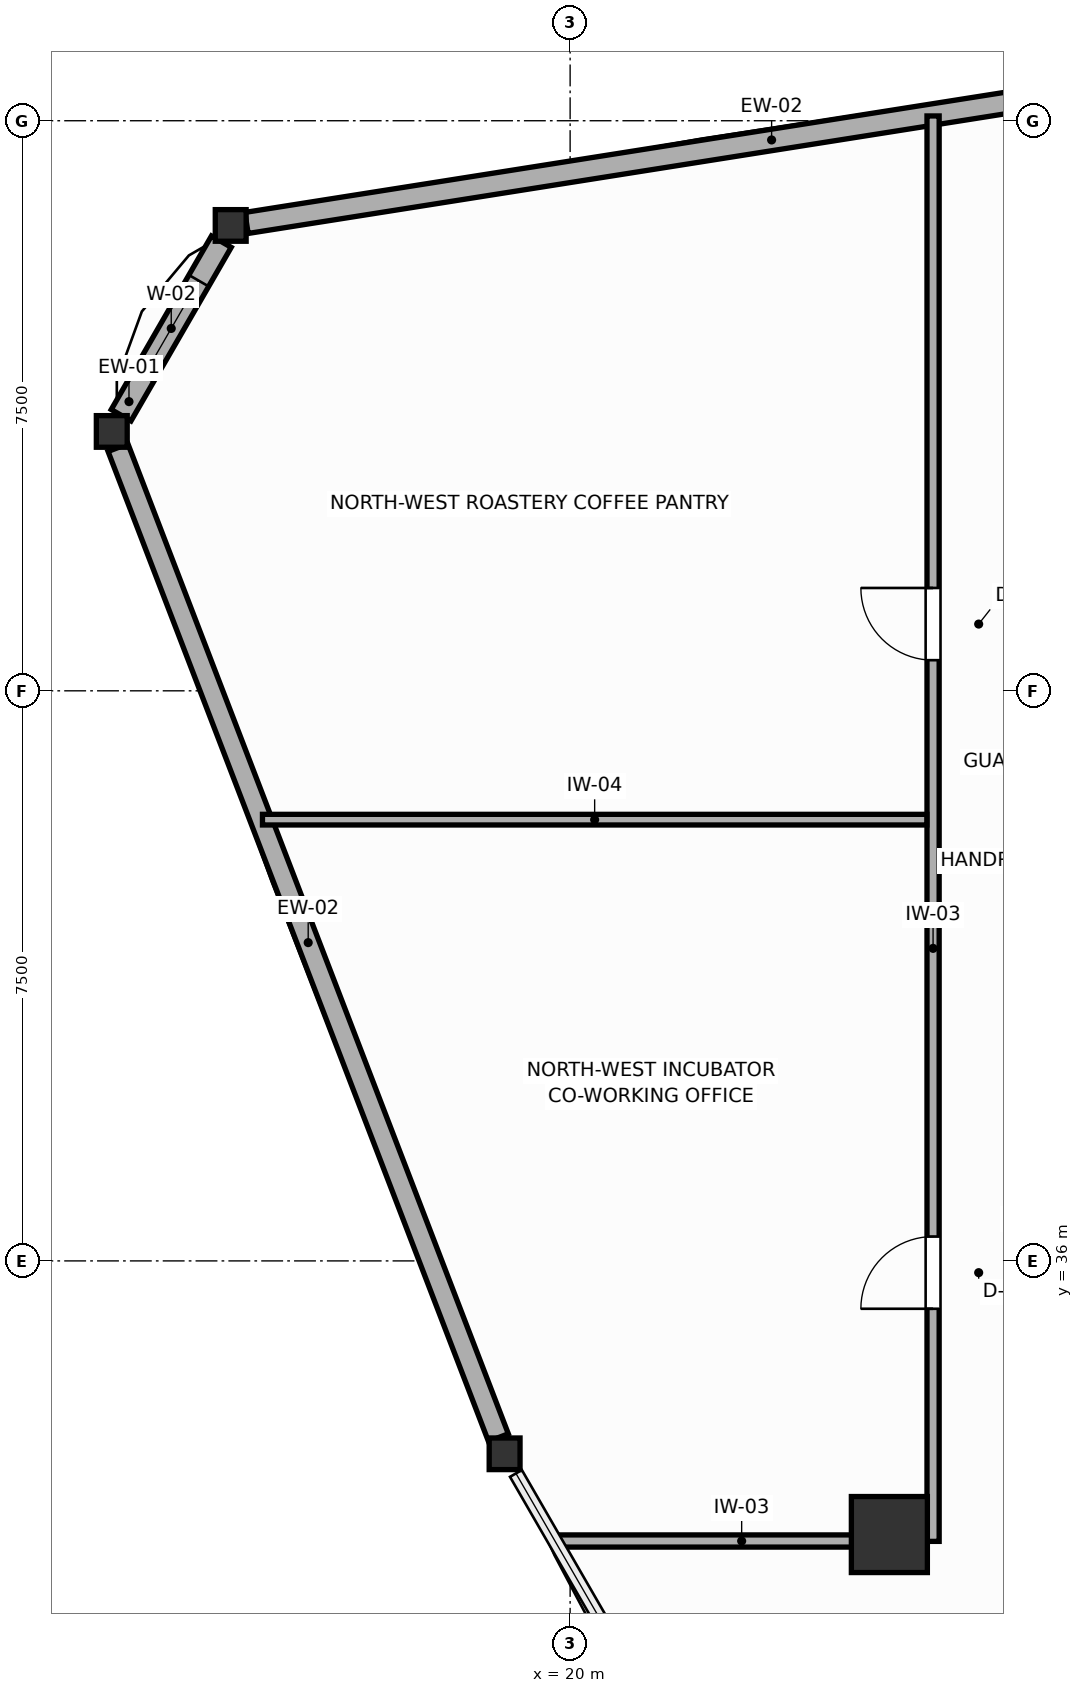
"""IFC4 building model, lengths in metres.
Left out: names, types, materials, properties, quantities, classifications, styles, units other than length and angle.
Written with IfcOpenShell. Run it as: python <this file> out.ifc"""

import sys

from ifc_helpers import new_model, si_unit, direction, frame, frame_2d, origin, origin_2d, place, context, subcontext, project, spatial, rectangle, i_section, extrude, source, transform, mapped, element, fill, save


model = new_model("IFC4")
c1 = context("Model", 3, precision=1e-05, world=origin(), true_north=direction((0.0, 1.0)))
c2 = subcontext(c1, "Body", "Model", "MODEL_VIEW")
j1 = project(units=[si_unit("LENGTHUNIT", "METRE"), si_unit("PLANEANGLEUNIT", "RADIAN")], contexts=[c1])
p1 = place(None, origin())
s1 = spatial("IfcSite", under=j1, at=p1, CompositionType="ELEMENT")
p2 = place(p1, origin())
s2 = spatial("IfcBuilding", under=s1, at=p2, CompositionType="ELEMENT")
p3 = place(p2, frame((0.0, 0.0, 193.8)))
s3 = spatial("IfcBuildingStorey", under=s2, at=p3, CompositionType="ELEMENT", Elevation=193.8)
m1 = source(origin(), c2, "Body", "SweptSolid", [
    extrude(rectangle(XDim=1.0, YDim=1.0, at=origin_2d()), origin(), (0.0, 0.0, 1.0), 3.6),
])
p4 = place(p3, frame((24.2, 32.4, 0.0), z_axis=(0.0, 0.0, 1.0), x_axis=(1.0, 0.0, 0.0)))
e1 = element("IfcColumn", 1, at=p4, inside=s3, PredefinedType="COLUMN", context=c2, shape_type="MappedRepresentation", body=[
    mapped(m1, transform((0.0, 0.0, 0.0), scale=1.0)),
])
m2 = source(origin(), c2, "Body", "SweptSolid", [
    extrude(i_section(OverallWidth=0.406, OverallDepth=0.416, WebThickness=0.027, FlangeThickness=0.044, FilletRadius=0.015, at=origin_2d()), origin(), (0.0, 0.0, 1.0), 3.6),
])
for number, where, z_axis, x_axis in (
    (2, (15.534, 49.623, 0.0), (0.0, 0.0, 1.0), (1.0, 0.0, 0.0)),
    (3, (13.97, 46.912, 0.0), (0.0, 0.0, 1.0), (1.0, 0.0, 0.0)),
    (4, (19.138, 33.462, 0.0), (0.0, 0.0, 1.0), (1.0, 0.0, 0.0)),
):
    element("IfcColumn", number, at=place(p3, frame(where, z_axis=z_axis, x_axis=x_axis)), inside=s3, PredefinedType="COLUMN", context=c2, shape_type="MappedRepresentation", body=[
        mapped(m2, transform((0.0, 0.0, 0.0), scale=1.0)),
    ])
p5 = place(p3, frame((29.559, 51.839, 0.0), z_axis=(0.0, 0.0, 1.0), x_axis=(-0.987743003355, -0.15608894683, 0.0)))
e5 = element("IfcWall", 5, at=p5, inside=s3, PredefinedType="SOLIDWALL", context=c2, shape_type="SweptSolid", body=[
    extrude(rectangle(XDim=13.988, YDim=0.28, at=frame_2d((6.994, 0.0))), origin(), (0.0, 0.0, 1.0), 2.95),
])
p6 = place(p3, frame((15.412, 49.409, 0.0), z_axis=(0.0, 0.0, 1.0), x_axis=(-0.500061666259, -0.865989797826, 0.0)))
e6 = element("IfcWall", 6, at=p6, inside=s3, PredefinedType="SOLIDWALL", context=c2, shape_type="SweptSolid", body=[
    extrude(rectangle(XDim=2.637, YDim=0.3, at=frame_2d((1.319, 0.0))), origin(), (0.0, 0.0, 1.0), 3.01),
])
p7 = place(p6, frame((0.594, 0.0, 0.75)))
e7 = element("IfcOpeningElement", 7, at=p7, cuts=e6, PredefinedType="OPENING", context=c2, shape_type="SweptSolid", body=[
    extrude(rectangle(XDim=1.45, YDim=1.65, at=frame_2d((0.725, 0.825))), frame((0.0, 0.16, 0.0), z_axis=(0.0, -1.0, 0.0), x_axis=(1.0, 0.0, 0.0)), (0.0, 0.0, 1.0), 0.32),
])
p8 = place(p3, frame((14.052, 46.699, 0.0), z_axis=(0.0, 0.0, 1.0), x_axis=(0.358703519473, -0.933451544065, 0.0)))
e8 = element("IfcWall", 8, at=p8, inside=s3, PredefinedType="SOLIDWALL", context=c2, shape_type="SweptSolid", body=[
    extrude(rectangle(XDim=13.953, YDim=0.28, at=frame_2d((6.976, 0.0))), origin(), (0.0, 0.0, 1.0), 2.95),
])
p9 = place(p3, frame((24.775, 32.31, 0.0), z_axis=(0.0, 0.0, 1.0), x_axis=(0.0, 1.0, 0.0)))
e9 = element("IfcWall", 9, at=p9, inside=s3, PredefinedType="PARTITIONING", context=c2, shape_type="SweptSolid", body=[
    extrude(rectangle(XDim=18.753, YDim=0.16, at=frame_2d((9.376, 0.0))), origin(), (0.0, 0.0, 1.0), 3.4),
])
p10 = place(p9, frame((3.06, 0.0, 0.0)))
e10 = element("IfcOpeningElement", 10, at=p10, cuts=e9, PredefinedType="OPENING", context=c2, shape_type="SweptSolid", body=[
    extrude(rectangle(XDim=0.95, YDim=2.05, at=frame_2d((0.475, 1.025))), frame((0.0, 0.09, 0.0), z_axis=(0.0, -1.0, 0.0), x_axis=(1.0, 0.0, 0.0)), (0.0, 0.0, 1.0), 0.18),
])
p11 = place(p9, frame((11.593, 0.0, 0.0)))
e11 = element("IfcOpeningElement", 11, at=p11, cuts=e9, PredefinedType="OPENING", context=c2, shape_type="SweptSolid", body=[
    extrude(rectangle(XDim=0.95, YDim=2.05, at=frame_2d((0.475, 1.025))), frame((0.0, 0.09, 0.0), z_axis=(0.0, -1.0, 0.0), x_axis=(1.0, 0.0, 0.0)), (0.0, 0.0, 1.0), 0.18),
])
p12 = place(p3, frame((19.82, 32.315, 0.0), z_axis=(0.0, 0.0, 1.0), x_axis=(1.0, 0.0, 0.0)))
e12 = element("IfcWall", 12, at=p12, inside=s3, PredefinedType="PARTITIONING", context=c2, shape_type="SweptSolid", body=[
    extrude(rectangle(XDim=4.873, YDim=0.16, at=frame_2d((2.437, 0.0))), origin(), (0.0, 0.0, 1.0), 2.95),
])
p13 = place(p3, frame((15.952, 41.805, 0.0), z_axis=(0.0, 0.0, 1.0), x_axis=(1.0, 0.0, 0.0)))
e13 = element("IfcWall", 13, at=p13, inside=s3, PredefinedType="PARTITIONING", context=c2, shape_type="SweptSolid", body=[
    extrude(rectangle(XDim=8.741, YDim=0.14, at=frame_2d((4.37, 0.0))), origin(), (0.0, 0.0, 1.0), 3.4),
])
p14 = place(p7, origin())
e14 = element("IfcWindow", 14, at=p14, inside=s3, PartitioningType="SINGLE_PANEL", PredefinedType="WINDOW", context=c2, shape_type="SweptSolid", body=[
    extrude(rectangle(XDim=1.45, YDim=1.65, at=frame_2d((0.725, 0.825))), frame((0.0, 0.03, 0.0), z_axis=(0.0, -1.0, 0.0), x_axis=(1.0, 0.0, 0.0)), (0.0, 0.0, 1.0), 0.06),
])
fill(e7, e14)
p15 = place(p10, origin())
e15 = element("IfcDoor", 15, at=p15, inside=s3, OperationType="SINGLE_SWING_LEFT", PredefinedType="DOOR", context=c2, shape_type="SweptSolid", body=[
    extrude(rectangle(XDim=0.95, YDim=2.05, at=frame_2d((0.475, 1.025))), frame((0.0, 0.025, 0.0), z_axis=(0.0, -1.0, 0.0), x_axis=(1.0, 0.0, 0.0)), (0.0, 0.0, 1.0), 0.05),
])
fill(e10, e15)
p16 = place(p11, origin())
e16 = element("IfcDoor", 16, at=p16, inside=s3, OperationType="SINGLE_SWING_RIGHT", PredefinedType="DOOR", context=c2, shape_type="SweptSolid", body=[
    extrude(rectangle(XDim=0.95, YDim=2.05, at=frame_2d((0.475, 1.025))), frame((0.0, 0.025, 0.0), z_axis=(0.0, -1.0, 0.0), x_axis=(1.0, 0.0, 0.0)), (0.0, 0.0, 1.0), 0.05),
])
fill(e11, e16)
save(model, sys.argv[1])
